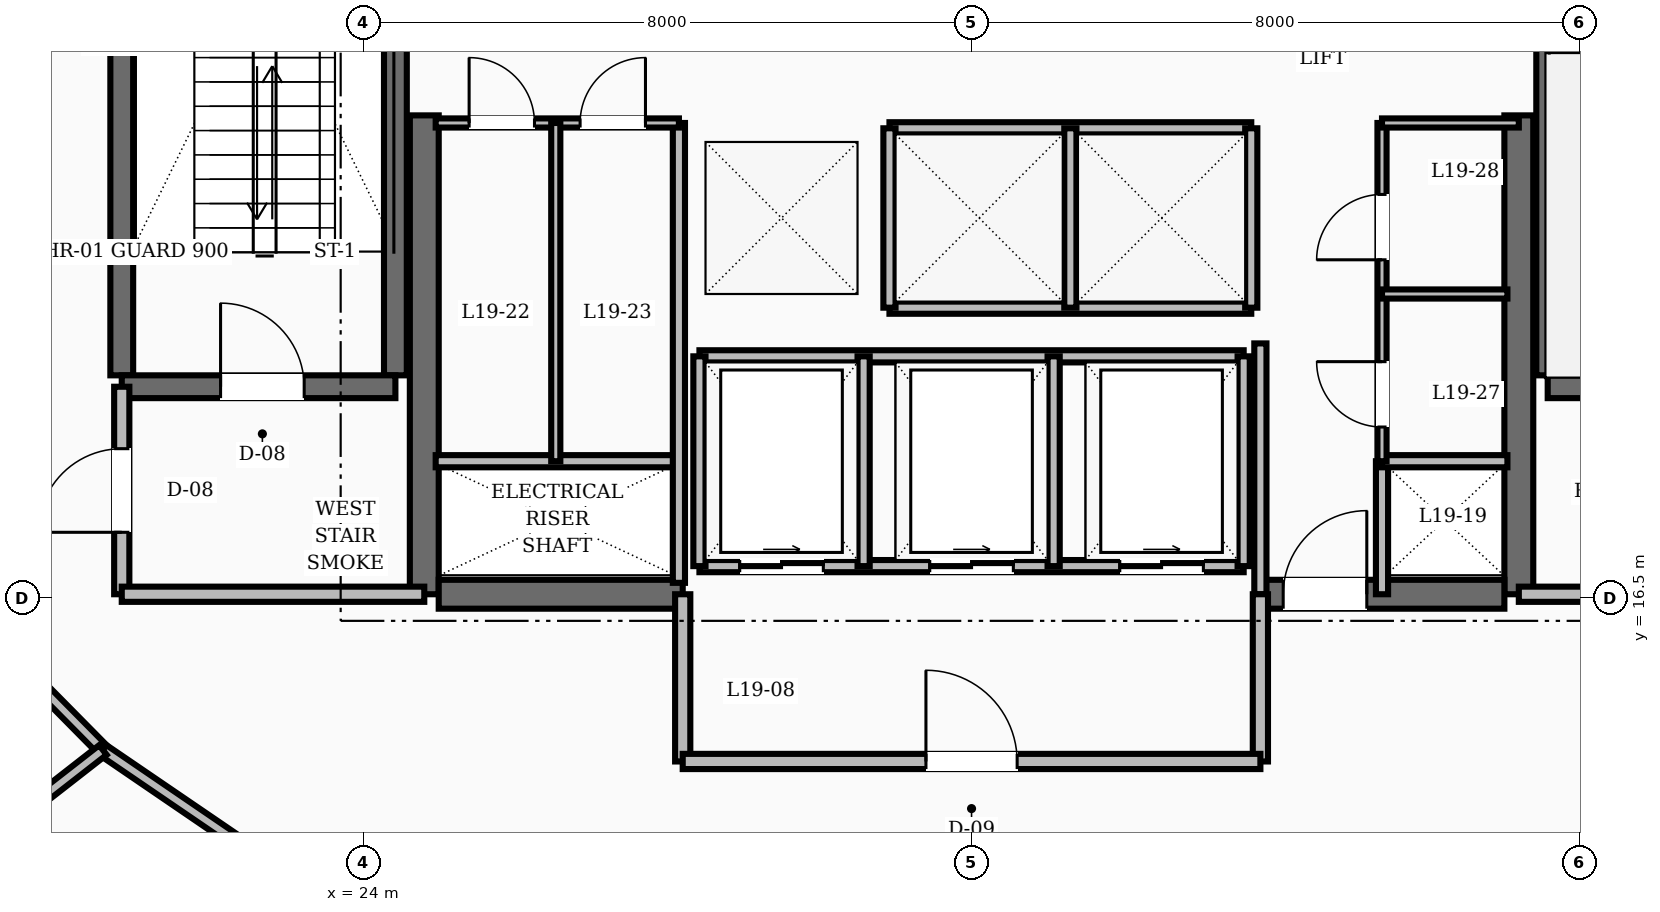
"""IFC4 building model, lengths in metres.
Left out: names, types, materials, properties, quantities, classifications, styles, units other than length and angle.
Written with IfcOpenShell. Run it as: python <this file> out.ifc"""

import sys

from ifc_helpers import new_model, si_unit, direction, frame, frame_2d, origin, place, context, subcontext, project, spatial, rectangle, extrude, element, fill, save


model = new_model("IFC4")
c1 = context("Model", 3, precision=1e-05, world=origin(), true_north=direction((0.0, 1.0)))
c2 = subcontext(c1, "Body", "Model", "MODEL_VIEW")
j1 = project(units=[si_unit("LENGTHUNIT", "METRE"), si_unit("PLANEANGLEUNIT", "RADIAN")], contexts=[c1])
p1 = place(None, origin())
s1 = spatial("IfcSite", under=j1, at=p1, CompositionType="ELEMENT")
p2 = place(p1, origin())
s2 = spatial("IfcBuilding", under=s1, at=p2, CompositionType="ELEMENT")
p3 = place(p2, frame((0.0, 0.0, 77.2)))
s3 = spatial("IfcBuildingStorey", under=s2, at=p3, CompositionType="ELEMENT", Elevation=77.2)
for number, where, z_axis, x_axis in (
    (1, (24.8, 16.55, 0.0), (0.0, 0.0, 1.0), (0.0, 1.0, 0.0)),
    (2, (39.2, 16.55, 0.0), (0.0, 0.0, 1.0), (0.0, 1.0, 0.0)),
):
    element("IfcWall", number, at=place(p3, frame(where, z_axis=z_axis, x_axis=x_axis)), inside=s3, PredefinedType="SHEAR", context=c2, shape_type="SweptSolid", body=[
        extrude(rectangle(XDim=6.3, YDim=0.38, at=frame_2d((3.15, 0.0))), origin(), (0.0, 0.0, 1.0), 3.6),
    ])
p4 = place(p3, frame((24.99, 16.55, 0.0), z_axis=(0.0, 0.0, 1.0), x_axis=(1.0, 0.0, 0.0)))
e3 = element("IfcWall", 3, at=p4, inside=s3, PredefinedType="SHEAR", context=c2, shape_type="SweptSolid", body=[
    extrude(rectangle(XDim=3.21, YDim=0.38, at=frame_2d((1.605, 0.0))), origin(), (0.0, 0.0, 1.0), 3.6),
])
p5 = place(p3, frame((35.8, 16.55, 0.0), z_axis=(0.0, 0.0, 1.0), x_axis=(1.0, 0.0, 0.0)))
e4 = element("IfcWall", 4, at=p5, inside=s3, PredefinedType="SHEAR", context=c2, shape_type="SweptSolid", body=[
    extrude(rectangle(XDim=3.21, YDim=0.38, at=frame_2d((1.605, 0.0))), origin(), (0.0, 0.0, 1.0), 3.6),
])
p6 = place(p5, frame((0.3, 0.0, 0.0)))
e5 = element("IfcOpeningElement", 5, at=p6, cuts=e4, PredefinedType="OPENING", context=c2, shape_type="SweptSolid", body=[
    extrude(rectangle(XDim=1.1, YDim=2.1, at=frame_2d((0.55, 1.05))), frame((0.0, 0.2, 0.0), z_axis=(0.0, -1.0, 0.0), x_axis=(1.0, 0.0, 0.0)), (0.0, 0.0, 1.0), 0.4),
])
for number, where, z_axis, x_axis in (
    (6, (20.82, 19.43, 0.0), (0.0, 0.0, 1.0), (0.0, 1.0, 0.0)),
    (7, (24.42, 19.43, 0.0), (0.0, 0.0, 1.0), (0.0, 1.0, 0.0)),
):
    element("IfcWall", number, at=place(p3, frame(where, z_axis=z_axis, x_axis=x_axis)), inside=s3, PredefinedType="SHEAR", context=c2, shape_type="SweptSolid", body=[
        extrude(rectangle(XDim=8.74, YDim=0.3, at=frame_2d((4.37, 0.0))), origin(), (0.0, 0.0, 1.0), 3.6),
    ])
p7 = place(p3, frame((20.82, 19.28, 0.0), z_axis=(0.0, 0.0, 1.0), x_axis=(1.0, 0.0, 0.0)))
e8 = element("IfcWall", 8, at=p7, inside=s3, PredefinedType="SHEAR", context=c2, shape_type="SweptSolid", body=[
    extrude(rectangle(XDim=3.6, YDim=0.3, at=frame_2d((1.8, 0.0))), origin(), (0.0, 0.0, 1.0), 3.6),
])
p8 = place(p7, frame((1.3, 0.0, 0.0)))
e9 = element("IfcOpeningElement", 9, at=p8, cuts=e8, PredefinedType="OPENING", context=c2, shape_type="SweptSolid", body=[
    extrude(rectangle(XDim=1.1, YDim=2.1, at=frame_2d((0.55, 1.05))), frame((0.0, 0.16, 0.0), z_axis=(0.0, -1.0, 0.0), x_axis=(1.0, 0.0, 0.0)), (0.0, 0.0, 1.0), 0.32),
])
p9 = place(p3, frame((39.58, 19.43, 0.0), z_axis=(0.0, 0.0, 1.0), x_axis=(0.0, 1.0, 0.0)))
e10 = element("IfcWall", 10, at=p9, inside=s3, PredefinedType="SHEAR", context=c2, shape_type="SweptSolid", body=[
    extrude(rectangle(XDim=8.74, YDim=0.3, at=frame_2d((4.37, 0.0))), origin(), (0.0, 0.0, 1.0), 3.6),
])
p10 = place(p3, frame((39.58, 19.28, 0.0), z_axis=(0.0, 0.0, 1.0), x_axis=(1.0, 0.0, 0.0)))
e11 = element("IfcWall", 11, at=p10, inside=s3, PredefinedType="SHEAR", context=c2, shape_type="SweptSolid", body=[
    extrude(rectangle(XDim=3.6, YDim=0.3, at=frame_2d((1.8, 0.0))), origin(), (0.0, 0.0, 1.0), 3.6),
])
p11 = place(p3, frame((20.82, 16.55, 0.0), z_axis=(0.0, 0.0, 1.0), x_axis=(0.0, 1.0, 0.0)))
e12 = element("IfcWall", 12, at=p11, inside=s3, PredefinedType="SOLIDWALL", context=c2, shape_type="SweptSolid", body=[
    extrude(rectangle(XDim=2.73, YDim=0.2, at=frame_2d((1.365, 0.0))), origin(), (0.0, 0.0, 1.0), 2.71),
])
p12 = place(p11, frame((0.815, 0.0, 0.0)))
e13 = element("IfcOpeningElement", 13, at=p12, cuts=e12, PredefinedType="OPENING", context=c2, shape_type="SweptSolid", body=[
    extrude(rectangle(XDim=1.1, YDim=2.1, at=frame_2d((0.55, 1.05))), frame((0.0, 0.11, 0.0), z_axis=(0.0, -1.0, 0.0), x_axis=(1.0, 0.0, 0.0)), (0.0, 0.0, 1.0), 0.22),
])
for number, where, z_axis, x_axis in (
    (14, (20.82, 16.55, 0.0), (0.0, 0.0, 1.0), (1.0, 0.0, 0.0)),
    (15, (39.2, 16.55, 0.0), (0.0, 0.0, 1.0), (1.0, 0.0, 0.0)),
):
    element("IfcWall", number, at=place(p3, frame(where, z_axis=z_axis, x_axis=x_axis)), inside=s3, PredefinedType="SOLIDWALL", context=c2, shape_type="SweptSolid", body=[
        extrude(rectangle(XDim=3.98, YDim=0.2, at=frame_2d((1.99, 0.0))), origin(), (0.0, 0.0, 1.0), 2.71),
    ])
p13 = place(p3, frame((35.8, 16.55, 0.0), z_axis=(0.0, 0.0, 1.0), x_axis=(0.0, 1.0, 0.0)))
e16 = element("IfcWall", 16, at=p13, inside=s3, PredefinedType="SOLIDWALL", context=c2, shape_type="SweptSolid", body=[
    extrude(rectangle(XDim=3.3, YDim=0.16, at=frame_2d((1.65, 0.0))), origin(), (0.0, 0.0, 1.0), 2.71),
])
p14 = place(p3, frame((37.4, 16.55, 0.0), z_axis=(0.0, 0.0, 1.0), x_axis=(0.0, 1.0, 0.0)))
e17 = element("IfcWall", 17, at=p14, inside=s3, PredefinedType="SOLIDWALL", context=c2, shape_type="SweptSolid", body=[
    extrude(rectangle(XDim=1.75, YDim=0.16, at=frame_2d((0.875, 0.0))), origin(), (0.0, 0.0, 1.0), 2.71),
])
for number, where, z_axis, x_axis in (
    (18, (28.2, 14.35, 0.0), (0.0, 0.0, 1.0), (0.0, 1.0, 0.0)),
    (19, (35.8, 14.35, 0.0), (0.0, 0.0, 1.0), (0.0, 1.0, 0.0)),
):
    element("IfcWall", number, at=place(p3, frame(where, z_axis=z_axis, x_axis=x_axis)), inside=s3, PredefinedType="SOLIDWALL", context=c2, shape_type="SweptSolid", body=[
        extrude(rectangle(XDim=2.2, YDim=0.2, at=frame_2d((1.1, 0.0))), origin(), (0.0, 0.0, 1.0), 2.71),
    ])
p15 = place(p3, frame((28.2, 14.35, 0.0), z_axis=(0.0, 0.0, 1.0), x_axis=(1.0, 0.0, 0.0)))
e20 = element("IfcWall", 20, at=p15, inside=s3, PredefinedType="SOLIDWALL", context=c2, shape_type="SweptSolid", body=[
    extrude(rectangle(XDim=7.6, YDim=0.2, at=frame_2d((3.8, 0.0))), origin(), (0.0, 0.0, 1.0), 2.71),
])
p16 = place(p15, frame((3.2, 0.0, 0.0)))
e21 = element("IfcOpeningElement", 21, at=p16, cuts=e20, PredefinedType="OPENING", context=c2, shape_type="SweptSolid", body=[
    extrude(rectangle(XDim=1.2, YDim=2.1, at=frame_2d((0.6, 1.05))), frame((0.0, 0.11, 0.0), z_axis=(0.0, -1.0, 0.0), x_axis=(1.0, 0.0, 0.0)), (0.0, 0.0, 1.0), 0.22),
])
for number, where, z_axis, x_axis in (
    (22, (30.92, 22.68, 0.0), (0.0, 0.0, 1.0), (1.0, 0.0, 0.0)),
    (23, (30.92, 20.32, 0.0), (0.0, 0.0, 1.0), (1.0, 0.0, 0.0)),
):
    element("IfcWall", number, at=place(p3, frame(where, z_axis=z_axis, x_axis=x_axis)), inside=s3, PredefinedType="SOLIDWALL", context=c2, shape_type="SweptSolid", body=[
        extrude(rectangle(XDim=4.76, YDim=0.16, at=frame_2d((2.38, 0.0))), origin(), (0.0, 0.0, 1.0), 2.71),
    ])
for number, where, z_axis, x_axis in (
    (24, (30.92, 20.32, 0.0), (0.0, 0.0, 1.0), (0.0, 1.0, 0.0)),
    (25, (33.3, 20.32, 0.0), (0.0, 0.0, 1.0), (0.0, 1.0, 0.0)),
    (26, (35.68, 20.32, 0.0), (0.0, 0.0, 1.0), (0.0, 1.0, 0.0)),
):
    element("IfcWall", number, at=place(p3, frame(where, z_axis=z_axis, x_axis=x_axis)), inside=s3, PredefinedType="SOLIDWALL", context=c2, shape_type="SweptSolid", body=[
        extrude(rectangle(XDim=2.36, YDim=0.16, at=frame_2d((1.18, 0.0))), origin(), (0.0, 0.0, 1.0), 2.71),
    ])
p17 = place(p3, frame((28.42, 16.92, 0.0), z_axis=(0.0, 0.0, 1.0), x_axis=(1.0, 0.0, 0.0)))
e27 = element("IfcWall", 27, at=p17, inside=s3, PredefinedType="SOLIDWALL", context=c2, shape_type="SweptSolid", body=[
    extrude(rectangle(XDim=7.16, YDim=0.16, at=frame_2d((3.58, 0.0))), origin(), (0.0, 0.0, 1.0), 2.71),
])
p18 = place(p17, frame((0.53, 0.0, 0.0)))
e28 = element("IfcOpeningElement", 28, at=p18, cuts=e27, PredefinedType="OPENING", context=c2, shape_type="SweptSolid", body=[
    extrude(rectangle(XDim=1.1, YDim=2.15, at=frame_2d((0.55, 1.075))), frame((0.0, 0.09, 0.0), z_axis=(0.0, -1.0, 0.0), x_axis=(1.0, 0.0, 0.0)), (0.0, 0.0, 1.0), 0.18),
])
p19 = place(p17, frame((3.03, 0.0, 0.0)))
e29 = element("IfcOpeningElement", 29, at=p19, cuts=e27, PredefinedType="OPENING", context=c2, shape_type="SweptSolid", body=[
    extrude(rectangle(XDim=1.1, YDim=2.15, at=frame_2d((0.55, 1.075))), frame((0.0, 0.09, 0.0), z_axis=(0.0, -1.0, 0.0), x_axis=(1.0, 0.0, 0.0)), (0.0, 0.0, 1.0), 0.18),
])
p20 = place(p17, frame((5.53, 0.0, 0.0)))
e30 = element("IfcOpeningElement", 30, at=p20, cuts=e27, PredefinedType="OPENING", context=c2, shape_type="SweptSolid", body=[
    extrude(rectangle(XDim=1.1, YDim=2.15, at=frame_2d((0.55, 1.075))), frame((0.0, 0.09, 0.0), z_axis=(0.0, -1.0, 0.0), x_axis=(1.0, 0.0, 0.0)), (0.0, 0.0, 1.0), 0.18),
])
p21 = place(p3, frame((28.42, 19.68, 0.0), z_axis=(0.0, 0.0, 1.0), x_axis=(1.0, 0.0, 0.0)))
e31 = element("IfcWall", 31, at=p21, inside=s3, PredefinedType="SOLIDWALL", context=c2, shape_type="SweptSolid", body=[
    extrude(rectangle(XDim=7.16, YDim=0.16, at=frame_2d((3.58, 0.0))), origin(), (0.0, 0.0, 1.0), 2.71),
])
for number, where, z_axis, x_axis in (
    (32, (28.42, 16.92, 0.0), (0.0, 0.0, 1.0), (0.0, 1.0, 0.0)),
    (33, (30.58, 16.92, 0.0), (0.0, 0.0, 1.0), (0.0, 1.0, 0.0)),
    (34, (33.08, 16.92, 0.0), (0.0, 0.0, 1.0), (0.0, 1.0, 0.0)),
    (35, (35.58, 16.92, 0.0), (0.0, 0.0, 1.0), (0.0, 1.0, 0.0)),
):
    element("IfcWall", number, at=place(p3, frame(where, z_axis=z_axis, x_axis=x_axis)), inside=s3, PredefinedType="SOLIDWALL", context=c2, shape_type="SweptSolid", body=[
        extrude(rectangle(XDim=2.76, YDim=0.16, at=frame_2d((1.38, 0.0))), origin(), (0.0, 0.0, 1.0), 2.71),
    ])
p22 = place(p3, frame((24.95, 18.3, 0.0), z_axis=(0.0, 0.0, 1.0), x_axis=(1.0, 0.0, 0.0)))
e36 = element("IfcWall", 36, at=p22, inside=s3, PredefinedType="SOLIDWALL", context=c2, shape_type="SweptSolid", body=[
    extrude(rectangle(XDim=3.2, YDim=0.16, at=frame_2d((1.6, 0.0))), origin(), (0.0, 0.0, 1.0), 2.71),
])
p23 = place(p3, frame((28.15, 16.7, 0.0), z_axis=(0.0, 0.0, 1.0), x_axis=(0.0, 1.0, 0.0)))
e37 = element("IfcWall", 37, at=p23, inside=s3, PredefinedType="SOLIDWALL", context=c2, shape_type="SweptSolid", body=[
    extrude(rectangle(XDim=6.05, YDim=0.16, at=frame_2d((3.025, 0.0))), origin(), (0.0, 0.0, 1.0), 2.71),
])
p24 = place(p3, frame((37.4, 18.3, 0.0), z_axis=(0.0, 0.0, 1.0), x_axis=(1.0, 0.0, 0.0)))
e38 = element("IfcWall", 38, at=p24, inside=s3, PredefinedType="SOLIDWALL", context=c2, shape_type="SweptSolid", body=[
    extrude(rectangle(XDim=1.65, YDim=0.16, at=frame_2d((0.825, 0.0))), origin(), (0.0, 0.0, 1.0), 2.71),
])
p25 = place(p3, frame((24.95, 22.75, 0.0), z_axis=(0.0, 0.0, 1.0), x_axis=(1.0, 0.0, 0.0)))
e39 = element("IfcWall", 39, at=p25, inside=s3, PredefinedType="PARTITIONING", context=c2, shape_type="SweptSolid", body=[
    extrude(rectangle(XDim=3.2, YDim=0.12, at=frame_2d((1.6, 0.0))), origin(), (0.0, 0.0, 1.0), 2.71),
])
p26 = place(p25, frame((0.44, 0.0, 0.0)))
e40 = element("IfcOpeningElement", 40, at=p26, cuts=e39, PredefinedType="OPENING", context=c2, shape_type="SweptSolid", body=[
    extrude(rectangle(XDim=0.86, YDim=2.1, at=frame_2d((0.43, 1.05))), frame((0.0, 0.07, 0.0), z_axis=(0.0, -1.0, 0.0), x_axis=(1.0, 0.0, 0.0)), (0.0, 0.0, 1.0), 0.14),
])
p27 = place(p25, frame((1.9, 0.0, 0.0)))
e41 = element("IfcOpeningElement", 41, at=p27, cuts=e39, PredefinedType="OPENING", context=c2, shape_type="SweptSolid", body=[
    extrude(rectangle(XDim=0.86, YDim=2.1, at=frame_2d((0.43, 1.05))), frame((0.0, 0.07, 0.0), z_axis=(0.0, -1.0, 0.0), x_axis=(1.0, 0.0, 0.0)), (0.0, 0.0, 1.0), 0.14),
])
p28 = place(p3, frame((37.4, 18.3, 0.0), z_axis=(0.0, 0.0, 1.0), x_axis=(0.0, 1.0, 0.0)))
e42 = element("IfcWall", 42, at=p28, inside=s3, PredefinedType="PARTITIONING", context=c2, shape_type="SweptSolid", body=[
    extrude(rectangle(XDim=4.45, YDim=0.12, at=frame_2d((2.225, 0.0))), origin(), (0.0, 0.0, 1.0), 2.71),
])
p29 = place(p28, frame((0.45, 0.0, 0.0)))
e43 = element("IfcOpeningElement", 43, at=p29, cuts=e42, PredefinedType="OPENING", context=c2, shape_type="SweptSolid", body=[
    extrude(rectangle(XDim=0.86, YDim=2.1, at=frame_2d((0.43, 1.05))), frame((0.0, 0.07, 0.0), z_axis=(0.0, -1.0, 0.0), x_axis=(1.0, 0.0, 0.0)), (0.0, 0.0, 1.0), 0.14),
])
p30 = place(p28, frame((2.65, 0.0, 0.0)))
e44 = element("IfcOpeningElement", 44, at=p30, cuts=e42, PredefinedType="OPENING", context=c2, shape_type="SweptSolid", body=[
    extrude(rectangle(XDim=0.86, YDim=2.1, at=frame_2d((0.43, 1.05))), frame((0.0, 0.07, 0.0), z_axis=(0.0, -1.0, 0.0), x_axis=(1.0, 0.0, 0.0)), (0.0, 0.0, 1.0), 0.14),
])
p31 = place(p3, frame((37.4, 22.75, 0.0), z_axis=(0.0, 0.0, 1.0), x_axis=(1.0, 0.0, 0.0)))
e45 = element("IfcWall", 45, at=p31, inside=s3, PredefinedType="PARTITIONING", context=c2, shape_type="SweptSolid", body=[
    extrude(rectangle(XDim=1.8, YDim=0.12, at=frame_2d((0.9, 0.0))), origin(), (0.0, 0.0, 1.0), 2.71),
])
p32 = place(p3, frame((26.53, 18.3, 0.0), z_axis=(0.0, 0.0, 1.0), x_axis=(0.0, 1.0, 0.0)))
e46 = element("IfcWall", 46, at=p32, inside=s3, PredefinedType="PARTITIONING", context=c2, shape_type="SweptSolid", body=[
    extrude(rectangle(XDim=4.45, YDim=0.12, at=frame_2d((2.225, 0.0))), origin(), (0.0, 0.0, 1.0), 2.71),
])
p33 = place(p3, frame((37.4, 20.5, 0.0), z_axis=(0.0, 0.0, 1.0), x_axis=(1.0, 0.0, 0.0)))
e47 = element("IfcWall", 47, at=p33, inside=s3, PredefinedType="PARTITIONING", context=c2, shape_type="SweptSolid", body=[
    extrude(rectangle(XDim=1.65, YDim=0.12, at=frame_2d((0.825, 0.0))), origin(), (0.0, 0.0, 1.0), 2.71),
])
p34 = place(p3, frame((18.562, 16.537, 0.0), z_axis=(0.0, 0.0, 1.0), x_axis=(0.702569520063, -0.711615113301, 0.0)))
e48 = element("IfcWall", 48, at=p34, inside=s3, PredefinedType="SOLIDWALL", context=c2, shape_type="SweptSolid", body=[
    extrude(rectangle(XDim=2.861, YDim=0.16, at=frame_2d((1.43, 0.0))), origin(), (0.0, 0.0, 1.0), 2.71),
])
p35 = place(p3, frame((20.572, 14.501, 0.0), z_axis=(0.0, 0.0, 1.0), x_axis=(0.826112340767, -0.563505457323, 0.0)))
e49 = element("IfcWall", 49, at=p35, inside=s3, PredefinedType="SOLIDWALL", context=c2, shape_type="SweptSolid", body=[
    extrude(rectangle(XDim=2.965, YDim=0.16, at=frame_2d((1.482, 0.0))), origin(), (0.0, 0.0, 1.0), 2.71),
])
p36 = place(p3, frame((20.572, 14.501, 0.0), z_axis=(0.0, 0.0, 1.0), x_axis=(-0.788645247131, -0.61484849693, 0.0)))
e50 = element("IfcWall", 50, at=p36, inside=s3, PredefinedType="SOLIDWALL", context=c2, shape_type="SweptSolid", body=[
    extrude(rectangle(XDim=9.193, YDim=0.16, at=frame_2d((4.596, 0.0))), origin(), (0.0, 0.0, 1.0), 2.71),
])
p37 = place(p8, origin())
e51 = element("IfcDoor", 51, at=p37, inside=s3, OperationType="SINGLE_SWING_LEFT", PredefinedType="DOOR", context=c2, shape_type="SweptSolid", body=[
    extrude(rectangle(XDim=1.1, YDim=2.1, at=frame_2d((0.55, 1.05))), frame((0.0, 0.025, 0.0), z_axis=(0.0, -1.0, 0.0), x_axis=(1.0, 0.0, 0.0)), (0.0, 0.0, 1.0), 0.05),
])
fill(e9, e51)
p38 = place(p12, origin())
e52 = element("IfcDoor", 52, at=p38, inside=s3, OperationType="SINGLE_SWING_LEFT", PredefinedType="DOOR", context=c2, shape_type="SweptSolid", body=[
    extrude(rectangle(XDim=1.1, YDim=2.1, at=frame_2d((0.55, 1.05))), frame((0.0, 0.025, 0.0), z_axis=(0.0, -1.0, 0.0), x_axis=(1.0, 0.0, 0.0)), (0.0, 0.0, 1.0), 0.05),
])
fill(e13, e52)
p39 = place(p6, origin())
e53 = element("IfcDoor", 53, at=p39, inside=s3, OperationType="SINGLE_SWING_RIGHT", PredefinedType="DOOR", context=c2, shape_type="SweptSolid", body=[
    extrude(rectangle(XDim=1.1, YDim=2.1, at=frame_2d((0.55, 1.05))), frame((0.0, 0.025, 0.0), z_axis=(0.0, -1.0, 0.0), x_axis=(1.0, 0.0, 0.0)), (0.0, 0.0, 1.0), 0.05),
])
fill(e5, e53)
p40 = place(p16, origin())
e54 = element("IfcDoor", 54, at=p40, inside=s3, OperationType="SINGLE_SWING_LEFT", PredefinedType="DOOR", context=c2, shape_type="SweptSolid", body=[
    extrude(rectangle(XDim=1.2, YDim=2.1, at=frame_2d((0.6, 1.05))), frame((0.0, 0.025, 0.0), z_axis=(0.0, -1.0, 0.0), x_axis=(1.0, 0.0, 0.0)), (0.0, 0.0, 1.0), 0.05),
])
fill(e21, e54)
p41 = place(p18, origin())
e55 = element("IfcDoor", 55, at=p41, inside=s3, OperationType="SLIDING_TO_RIGHT", PredefinedType="DOOR", context=c2, shape_type="SweptSolid", body=[
    extrude(rectangle(XDim=1.1, YDim=2.15, at=frame_2d((0.55, 1.075))), frame((0.0, 0.025, 0.0), z_axis=(0.0, -1.0, 0.0), x_axis=(1.0, 0.0, 0.0)), (0.0, 0.0, 1.0), 0.05),
])
fill(e28, e55)
p42 = place(p19, origin())
e56 = element("IfcDoor", 56, at=p42, inside=s3, OperationType="SLIDING_TO_RIGHT", PredefinedType="DOOR", context=c2, shape_type="SweptSolid", body=[
    extrude(rectangle(XDim=1.1, YDim=2.15, at=frame_2d((0.55, 1.075))), frame((0.0, 0.025, 0.0), z_axis=(0.0, -1.0, 0.0), x_axis=(1.0, 0.0, 0.0)), (0.0, 0.0, 1.0), 0.05),
])
fill(e29, e56)
p43 = place(p20, origin())
e57 = element("IfcDoor", 57, at=p43, inside=s3, OperationType="SLIDING_TO_RIGHT", PredefinedType="DOOR", context=c2, shape_type="SweptSolid", body=[
    extrude(rectangle(XDim=1.1, YDim=2.15, at=frame_2d((0.55, 1.075))), frame((0.0, 0.025, 0.0), z_axis=(0.0, -1.0, 0.0), x_axis=(1.0, 0.0, 0.0)), (0.0, 0.0, 1.0), 0.05),
])
fill(e30, e57)
p44 = place(p26, origin())
e58 = element("IfcDoor", 58, at=p44, inside=s3, OperationType="SINGLE_SWING_LEFT", PredefinedType="DOOR", context=c2, shape_type="SweptSolid", body=[
    extrude(rectangle(XDim=0.86, YDim=2.1, at=frame_2d((0.43, 1.05))), frame((0.0, 0.025, 0.0), z_axis=(0.0, -1.0, 0.0), x_axis=(1.0, 0.0, 0.0)), (0.0, 0.0, 1.0), 0.05),
])
fill(e40, e58)
p45 = place(p27, origin())
e59 = element("IfcDoor", 59, at=p45, inside=s3, OperationType="SINGLE_SWING_RIGHT", PredefinedType="DOOR", context=c2, shape_type="SweptSolid", body=[
    extrude(rectangle(XDim=0.86, YDim=2.1, at=frame_2d((0.43, 1.05))), frame((0.0, 0.025, 0.0), z_axis=(0.0, -1.0, 0.0), x_axis=(1.0, 0.0, 0.0)), (0.0, 0.0, 1.0), 0.05),
])
fill(e41, e59)
p46 = place(p29, origin())
e60 = element("IfcDoor", 60, at=p46, inside=s3, OperationType="SINGLE_SWING_RIGHT", PredefinedType="DOOR", context=c2, shape_type="SweptSolid", body=[
    extrude(rectangle(XDim=0.86, YDim=2.1, at=frame_2d((0.43, 1.05))), frame((0.0, 0.025, 0.0), z_axis=(0.0, -1.0, 0.0), x_axis=(1.0, 0.0, 0.0)), (0.0, 0.0, 1.0), 0.05),
])
fill(e43, e60)
p47 = place(p30, origin())
e61 = element("IfcDoor", 61, at=p47, inside=s3, OperationType="SINGLE_SWING_LEFT", PredefinedType="DOOR", context=c2, shape_type="SweptSolid", body=[
    extrude(rectangle(XDim=0.86, YDim=2.1, at=frame_2d((0.43, 1.05))), frame((0.0, 0.025, 0.0), z_axis=(0.0, -1.0, 0.0), x_axis=(1.0, 0.0, 0.0)), (0.0, 0.0, 1.0), 0.05),
])
fill(e44, e61)
save(model, sys.argv[1])
